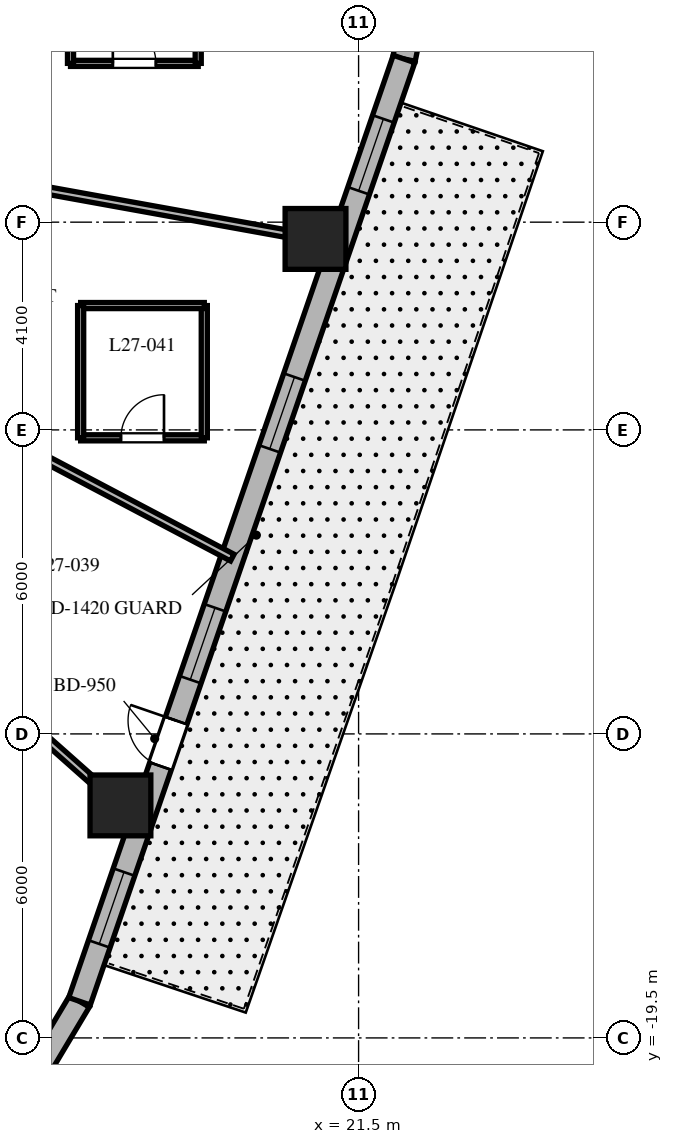
"""IFC4 building model, lengths in metres.
Left out: names, types, materials, properties, quantities, classifications, styles, units other than length and angle.
Written with IfcOpenShell. Run it as: python <this file> out.ifc"""

import sys

from ifc_helpers import new_model, si_unit, direction, frame, frame_2d, origin, origin_2d, place, context, subcontext, project, spatial, rectangle, extrude, element, fill, save


model = new_model("IFC4")
c1 = context("Model", 3, precision=1e-05, world=origin(), true_north=direction((0.0, 1.0)))
c2 = subcontext(c1, "Body", "Model", "MODEL_VIEW")
j1 = project(units=[si_unit("LENGTHUNIT", "METRE"), si_unit("PLANEANGLEUNIT", "RADIAN")], contexts=[c1])
p1 = place(None, origin())
s1 = spatial("IfcSite", under=j1, at=p1, CompositionType="ELEMENT")
p2 = place(p1, origin())
s2 = spatial("IfcBuilding", under=s1, at=p2, CompositionType="ELEMENT")
p3 = place(p2, frame((0.0, 0.0, 113.6)))
s3 = spatial("IfcBuildingStorey", under=s2, at=p3, CompositionType="ELEMENT", Elevation=113.6)
for number, where, z_axis, x_axis in (
    (1, (16.8, -14.911, 0.0), (0.0, 0.0, 1.0), (1.0, 0.0, 0.0)),
    (2, (20.65, -3.731, 0.0), (0.0, 0.0, 1.0), (1.0, 0.0, 0.0)),
):
    element("IfcColumn", number, at=place(p3, frame(where, z_axis=z_axis, x_axis=x_axis)), inside=s3, PredefinedType="COLUMN", context=c2, shape_type="SweptSolid", body=[
        extrude(rectangle(XDim=1.2, YDim=1.2, at=origin_2d()), origin(), (0.0, 0.0, 1.0), 3.7),
    ])
p4 = place(p3, frame((15.272, -19.984, 0.0), z_axis=(0.0, 0.0, 1.0), x_axis=(0.512579347361, 0.858639862025, 0.0)))
e3 = element("IfcWall", 3, at=p4, inside=s3, PredefinedType="SOLIDWALL", context=c2, shape_type="SweptSolid", body=[
    extrude(rectangle(XDim=1.406, YDim=0.45, at=frame_2d((0.703, 0.0))), origin(), (0.0, 0.0, 1.0), 3.4),
])
p5 = place(p3, frame((22.397, -0.179, 0.0), z_axis=(0.0, 0.0, 1.0), x_axis=(0.199313589404, 0.979935759669, 0.0)))
e4 = element("IfcWall", 4, at=p5, inside=s3, PredefinedType="SOLIDWALL", context=c2, shape_type="SweptSolid", body=[
    extrude(rectangle(XDim=0.896, YDim=0.45, at=frame_2d((0.448, 0.0))), origin(), (0.0, 0.0, 1.0), 3.4),
])
p6 = place(p3, frame((15.992, -18.777, 0.0), z_axis=(0.0, 0.0, 1.0), x_axis=(0.325606988926, 0.945505202927, 0.0)))
e5 = element("IfcWall", 5, at=p6, inside=s3, PredefinedType="SOLIDWALL", context=c2, shape_type="SweptSolid", body=[
    extrude(rectangle(XDim=19.669, YDim=0.45, at=frame_2d((9.835, 0.0))), origin(), (0.0, 0.0, 1.0), 3.4),
])
p7 = place(p6, frame((4.909, 0.0, 0.0)))
e6 = element("IfcOpeningElement", 6, at=p7, cuts=e5, PredefinedType="OPENING", context=c2, shape_type="SweptSolid", body=[
    extrude(rectangle(XDim=0.95, YDim=2.15, at=frame_2d((0.475, 1.075))), frame((0.0, 0.235, 0.0), z_axis=(0.0, -1.0, 0.0), x_axis=(1.0, 0.0, 0.0)), (0.0, 0.0, 1.0), 0.47),
])
p8 = place(p6, frame((1.197, 0.0, 0.8)))
e7 = element("IfcOpeningElement", 7, at=p8, cuts=e5, PredefinedType="OPENING", context=c2, shape_type="SweptSolid", body=[
    extrude(rectangle(XDim=1.5, YDim=1.8, at=frame_2d((0.75, 0.9))), frame((0.0, 0.235, 0.0), z_axis=(0.0, -1.0, 0.0), x_axis=(1.0, 0.0, 0.0)), (0.0, 0.0, 1.0), 0.47),
])
p9 = place(p6, frame((6.714, 0.0, 0.8)))
e8 = element("IfcOpeningElement", 8, at=p9, cuts=e5, PredefinedType="OPENING", context=c2, shape_type="SweptSolid", body=[
    extrude(rectangle(XDim=1.5, YDim=1.8, at=frame_2d((0.75, 0.9))), frame((0.0, 0.235, 0.0), z_axis=(0.0, -1.0, 0.0), x_axis=(1.0, 0.0, 0.0)), (0.0, 0.0, 1.0), 0.47),
])
p10 = place(p6, frame((11.53, 0.0, 0.8)))
e9 = element("IfcOpeningElement", 9, at=p10, cuts=e5, PredefinedType="OPENING", context=c2, shape_type="SweptSolid", body=[
    extrude(rectangle(XDim=1.5, YDim=1.8, at=frame_2d((0.75, 0.9))), frame((0.0, 0.235, 0.0), z_axis=(0.0, -1.0, 0.0), x_axis=(1.0, 0.0, 0.0)), (0.0, 0.0, 1.0), 0.47),
])
p11 = place(p6, frame((16.918, 0.0, 0.8)))
e10 = element("IfcOpeningElement", 10, at=p11, cuts=e5, PredefinedType="OPENING", context=c2, shape_type="SweptSolid", body=[
    extrude(rectangle(XDim=1.5, YDim=1.8, at=frame_2d((0.75, 0.9))), frame((0.0, 0.235, 0.0), z_axis=(0.0, -1.0, 0.0), x_axis=(1.0, 0.0, 0.0)), (0.0, 0.0, 1.0), 0.47),
])
p12 = place(p3, frame((11.098, -9.85, 0.0), z_axis=(0.0, 0.0, 1.0), x_axis=(0.747904295103, -0.663806572253, 0.0)))
e11 = element("IfcWall", 11, at=p12, inside=s3, PredefinedType="PARTITIONING", context=c2, shape_type="SweptSolid", body=[
    extrude(rectangle(XDim=8.16, YDim=0.15, at=frame_2d((4.08, 0.0))), origin(), (0.0, 0.0, 1.0), 2.54),
])
p13 = place(p3, frame((11.35, -5.983, 0.0), z_axis=(0.0, 0.0, 1.0), x_axis=(0.884597447182, -0.466355397137, 0.0)))
e12 = element("IfcWall", 12, at=p13, inside=s3, PredefinedType="PARTITIONING", context=c2, shape_type="SweptSolid", body=[
    extrude(rectangle(XDim=8.657, YDim=0.15, at=frame_2d((4.328, 0.0))), origin(), (0.0, 0.0, 1.0), 2.54),
])
p14 = place(p3, frame((11.35, -2.051, 0.0), z_axis=(0.0, 0.0, 1.0), x_axis=(0.984068313063, -0.177790762484, 0.0)))
e13 = element("IfcWall", 13, at=p14, inside=s3, PredefinedType="PARTITIONING", context=c2, shape_type="SweptSolid", body=[
    extrude(rectangle(XDim=9.951, YDim=0.15, at=frame_2d((4.976, 0.0))), origin(), (0.0, 0.0, 1.0), 2.54),
])
p15 = place(p3, frame((16.015, -7.656, 0.0), z_axis=(0.0, 0.0, 1.0), x_axis=(1.0, 0.0, 0.0)))
e14 = element("IfcWall", 14, at=p15, inside=s3, PredefinedType="PARTITIONING", context=c2, shape_type="SweptSolid", body=[
    extrude(rectangle(XDim=2.44, YDim=0.12, at=frame_2d((1.22, 0.0))), origin(), (0.0, 0.0, 1.0), 3.4),
])
p16 = place(p15, frame((0.795, 0.0, 0.0)))
e15 = element("IfcOpeningElement", 15, at=p16, cuts=e14, PredefinedType="OPENING", context=c2, shape_type="SweptSolid", body=[
    extrude(rectangle(XDim=0.85, YDim=2.03, at=frame_2d((0.425, 1.015))), frame((0.0, 0.07, 0.0), z_axis=(0.0, -1.0, 0.0), x_axis=(1.0, 0.0, 0.0)), (0.0, 0.0, 1.0), 0.14),
])
p17 = place(p3, frame((18.455, -7.656, 0.0), z_axis=(0.0, 0.0, 1.0), x_axis=(0.0, 1.0, 0.0)))
e16 = element("IfcWall", 16, at=p17, inside=s3, PredefinedType="PARTITIONING", context=c2, shape_type="SweptSolid", body=[
    extrude(rectangle(XDim=2.61, YDim=0.12, at=frame_2d((1.305, 0.0))), origin(), (0.0, 0.0, 1.0), 3.4),
])
p18 = place(p3, frame((18.455, -5.046, 0.0), z_axis=(0.0, 0.0, 1.0), x_axis=(-1.0, 0.0, 0.0)))
e17 = element("IfcWall", 17, at=p18, inside=s3, PredefinedType="PARTITIONING", context=c2, shape_type="SweptSolid", body=[
    extrude(rectangle(XDim=2.44, YDim=0.12, at=frame_2d((1.22, 0.0))), origin(), (0.0, 0.0, 1.0), 2.84),
])
p19 = place(p3, frame((16.015, -5.046, 0.0), z_axis=(0.0, 0.0, 1.0), x_axis=(0.0, -1.0, 0.0)))
e18 = element("IfcWall", 18, at=p19, inside=s3, PredefinedType="PARTITIONING", context=c2, shape_type="SweptSolid", body=[
    extrude(rectangle(XDim=2.61, YDim=0.12, at=frame_2d((1.305, 0.0))), origin(), (0.0, 0.0, 1.0), 2.84),
])
p20 = place(p3, frame((15.815, -0.266, 0.0), z_axis=(0.0, 0.0, 1.0), x_axis=(1.0, 0.0, 0.0)))
e19 = element("IfcWall", 19, at=p20, inside=s3, PredefinedType="PARTITIONING", context=c2, shape_type="SweptSolid", body=[
    extrude(rectangle(XDim=2.52, YDim=0.12, at=frame_2d((1.26, 0.0))), origin(), (0.0, 0.0, 1.0), 2.84),
])
p21 = place(p20, frame((0.835, 0.0, 0.0)))
e20 = element("IfcOpeningElement", 20, at=p21, cuts=e19, PredefinedType="OPENING", context=c2, shape_type="SweptSolid", body=[
    extrude(rectangle(XDim=0.85, YDim=2.03, at=frame_2d((0.425, 1.015))), frame((0.0, 0.07, 0.0), z_axis=(0.0, -1.0, 0.0), x_axis=(1.0, 0.0, 0.0)), (0.0, 0.0, 1.0), 0.14),
])
for number, where, z_axis, x_axis in (
    (21, (18.335, -0.266, 0.0), (0.0, 0.0, 1.0), (0.0, 1.0, 0.0)),
    (22, (15.815, 2.414, 0.0), (0.0, 0.0, 1.0), (0.0, -1.0, 0.0)),
):
    element("IfcWall", number, at=place(p3, frame(where, z_axis=z_axis, x_axis=x_axis)), inside=s3, PredefinedType="PARTITIONING", context=c2, shape_type="SweptSolid", body=[
        extrude(rectangle(XDim=2.68, YDim=0.12, at=frame_2d((1.34, 0.0))), origin(), (0.0, 0.0, 1.0), 3.4),
    ])
p22 = place(p7, origin())
e23 = element("IfcDoor", 23, at=p22, inside=s3, OperationType="SINGLE_SWING_RIGHT", PredefinedType="DOOR", context=c2, shape_type="SweptSolid", body=[
    extrude(rectangle(XDim=0.95, YDim=2.15, at=frame_2d((0.475, 1.075))), frame((0.0, 0.025, 0.0), z_axis=(0.0, -1.0, 0.0), x_axis=(1.0, 0.0, 0.0)), (0.0, 0.0, 1.0), 0.05),
])
fill(e6, e23)
p23 = place(p8, origin())
e24 = element("IfcWindow", 24, at=p23, inside=s3, PartitioningType="SINGLE_PANEL", PredefinedType="WINDOW", context=c2, shape_type="SweptSolid", body=[
    extrude(rectangle(XDim=1.5, YDim=1.8, at=frame_2d((0.75, 0.9))), frame((0.0, 0.03, 0.0), z_axis=(0.0, -1.0, 0.0), x_axis=(1.0, 0.0, 0.0)), (0.0, 0.0, 1.0), 0.06),
])
fill(e7, e24)
p24 = place(p9, origin())
e25 = element("IfcWindow", 25, at=p24, inside=s3, PartitioningType="SINGLE_PANEL", PredefinedType="WINDOW", context=c2, shape_type="SweptSolid", body=[
    extrude(rectangle(XDim=1.5, YDim=1.8, at=frame_2d((0.75, 0.9))), frame((0.0, 0.03, 0.0), z_axis=(0.0, -1.0, 0.0), x_axis=(1.0, 0.0, 0.0)), (0.0, 0.0, 1.0), 0.06),
])
fill(e8, e25)
p25 = place(p10, origin())
e26 = element("IfcWindow", 26, at=p25, inside=s3, PartitioningType="SINGLE_PANEL", PredefinedType="WINDOW", context=c2, shape_type="SweptSolid", body=[
    extrude(rectangle(XDim=1.5, YDim=1.8, at=frame_2d((0.75, 0.9))), frame((0.0, 0.03, 0.0), z_axis=(0.0, -1.0, 0.0), x_axis=(1.0, 0.0, 0.0)), (0.0, 0.0, 1.0), 0.06),
])
fill(e9, e26)
p26 = place(p11, origin())
e27 = element("IfcWindow", 27, at=p26, inside=s3, PartitioningType="SINGLE_PANEL", PredefinedType="WINDOW", context=c2, shape_type="SweptSolid", body=[
    extrude(rectangle(XDim=1.5, YDim=1.8, at=frame_2d((0.75, 0.9))), frame((0.0, 0.03, 0.0), z_axis=(0.0, -1.0, 0.0), x_axis=(1.0, 0.0, 0.0)), (0.0, 0.0, 1.0), 0.06),
])
fill(e10, e27)
p27 = place(p16, origin())
e28 = element("IfcDoor", 28, at=p27, inside=s3, OperationType="SINGLE_SWING_RIGHT", PredefinedType="DOOR", context=c2, shape_type="SweptSolid", body=[
    extrude(rectangle(XDim=0.85, YDim=2.03, at=frame_2d((0.425, 1.015))), frame((0.0, 0.025, 0.0), z_axis=(0.0, -1.0, 0.0), x_axis=(1.0, 0.0, 0.0)), (0.0, 0.0, 1.0), 0.05),
])
fill(e15, e28)
p28 = place(p21, origin())
e29 = element("IfcDoor", 29, at=p28, inside=s3, OperationType="SINGLE_SWING_LEFT", PredefinedType="DOOR", context=c2, shape_type="SweptSolid", body=[
    extrude(rectangle(XDim=0.85, YDim=2.03, at=frame_2d((0.425, 1.015))), frame((0.0, 0.025, 0.0), z_axis=(0.0, -1.0, 0.0), x_axis=(1.0, 0.0, 0.0)), (0.0, 0.0, 1.0), 0.05),
])
fill(e20, e29)
save(model, sys.argv[1])
